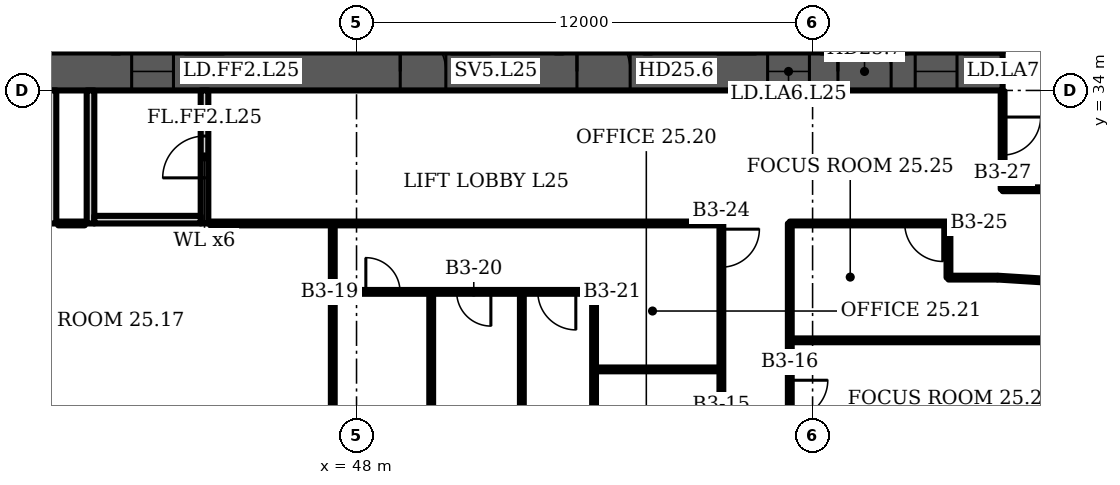
"""IFC4 building model, lengths in metres.
Left out: names, types, materials, properties, quantities, classifications, styles, units other than length and angle.
Written with IfcOpenShell. Run it as: python <this file> out.ifc"""

import sys

from ifc_helpers import new_model, si_unit, direction, frame, frame_2d, origin, place, context, subcontext, project, spatial, rectangle, extrude, element, fill, save


model = new_model("IFC4")
c1 = context("Model", 3, precision=1e-05, world=origin(), true_north=direction((0.0, 1.0)))
c2 = subcontext(c1, "Body", "Model", "MODEL_VIEW")
j1 = project(units=[si_unit("LENGTHUNIT", "METRE"), si_unit("PLANEANGLEUNIT", "RADIAN")], contexts=[c1])
p1 = place(None, origin())
s1 = spatial("IfcSite", under=j1, at=p1, CompositionType="ELEMENT")
p2 = place(p1, origin())
s2 = spatial("IfcBuilding", under=s1, at=p2, CompositionType="ELEMENT")
p3 = place(p2, frame((0.0, 0.0, 111.1)))
s3 = spatial("IfcBuildingStorey", under=s2, at=p3, CompositionType="ELEMENT", Elevation=111.1)
p4 = place(p3, frame((16.0, 34.5, 0.0), z_axis=(0.0, 0.0, 1.0), x_axis=(1.0, 0.0, 0.0)))
e1 = element("IfcWall", 1, at=p4, inside=s3, PredefinedType="SHEAR", context=c2, shape_type="SweptSolid", body=[
    extrude(rectangle(XDim=49.0, YDim=1.0, at=frame_2d((24.5, 0.0))), origin(), (0.0, 0.0, 1.0), 3.6),
])
p5 = place(p4, frame((1.2, 0.0, 0.0)))
e2 = element("IfcOpeningElement", 2, at=p5, cuts=e1, PredefinedType="OPENING", context=c2, shape_type="SweptSolid", body=[
    extrude(rectangle(XDim=1.1, YDim=2.1, at=frame_2d((0.55, 1.05))), frame((0.0, 0.51, 0.0), z_axis=(0.0, -1.0, 0.0), x_axis=(1.0, 0.0, 0.0)), (0.0, 0.0, 1.0), 1.02),
])
p6 = place(p4, frame((5.083, 0.0, 0.0)))
e3 = element("IfcOpeningElement", 3, at=p6, cuts=e1, PredefinedType="OPENING", context=c2, shape_type="SweptSolid", body=[
    extrude(rectangle(XDim=1.1, YDim=2.1, at=frame_2d((0.55, 1.05))), frame((0.0, 0.51, 0.0), z_axis=(0.0, -1.0, 0.0), x_axis=(1.0, 0.0, 0.0)), (0.0, 0.0, 1.0), 1.02),
])
p7 = place(p4, frame((2.933, 0.0, 0.0)))
e4 = element("IfcOpeningElement", 4, at=p7, cuts=e1, PredefinedType="OPENING", context=c2, shape_type="SweptSolid", body=[
    extrude(rectangle(XDim=1.4, YDim=2.1, at=frame_2d((0.7, 1.05))), frame((0.0, 0.51, 0.0), z_axis=(0.0, -1.0, 0.0), x_axis=(1.0, 0.0, 0.0)), (0.0, 0.0, 1.0), 1.02),
])
p8 = place(p4, frame((7.65, 0.0, 0.0)))
e5 = element("IfcOpeningElement", 5, at=p8, cuts=e1, PredefinedType="OPENING", context=c2, shape_type="SweptSolid", body=[
    extrude(rectangle(XDim=1.2, YDim=2.1, at=frame_2d((0.6, 1.05))), frame((0.0, 0.51, 0.0), z_axis=(0.0, -1.0, 0.0), x_axis=(1.0, 0.0, 0.0)), (0.0, 0.0, 1.0), 1.02),
])
p9 = place(p4, frame((14.817, 0.0, 0.0)))
e6 = element("IfcOpeningElement", 6, at=p9, cuts=e1, PredefinedType="OPENING", context=c2, shape_type="SweptSolid", body=[
    extrude(rectangle(XDim=1.1, YDim=2.1, at=frame_2d((0.55, 1.05))), frame((0.0, 0.51, 0.0), z_axis=(0.0, -1.0, 0.0), x_axis=(1.0, 0.0, 0.0)), (0.0, 0.0, 1.0), 1.02),
])
p10 = place(p4, frame((19.083, 0.0, 0.0)))
e7 = element("IfcOpeningElement", 7, at=p10, cuts=e1, PredefinedType="OPENING", context=c2, shape_type="SweptSolid", body=[
    extrude(rectangle(XDim=1.1, YDim=2.1, at=frame_2d((0.55, 1.05))), frame((0.0, 0.51, 0.0), z_axis=(0.0, -1.0, 0.0), x_axis=(1.0, 0.0, 0.0)), (0.0, 0.0, 1.0), 1.02),
])
p11 = place(p4, frame((16.8, 0.0, 0.0)))
e8 = element("IfcOpeningElement", 8, at=p11, cuts=e1, PredefinedType="OPENING", context=c2, shape_type="SweptSolid", body=[
    extrude(rectangle(XDim=1.4, YDim=2.1, at=frame_2d((0.7, 1.05))), frame((0.0, 0.51, 0.0), z_axis=(0.0, -1.0, 0.0), x_axis=(1.0, 0.0, 0.0)), (0.0, 0.0, 1.0), 1.02),
])
p12 = place(p4, frame((21.817, 0.0, 0.0)))
e9 = element("IfcOpeningElement", 9, at=p12, cuts=e1, PredefinedType="OPENING", context=c2, shape_type="SweptSolid", body=[
    extrude(rectangle(XDim=1.1, YDim=2.1, at=frame_2d((0.55, 1.05))), frame((0.0, 0.51, 0.0), z_axis=(0.0, -1.0, 0.0), x_axis=(1.0, 0.0, 0.0)), (0.0, 0.0, 1.0), 1.02),
])
p13 = place(p4, frame((26.083, 0.0, 0.0)))
e10 = element("IfcOpeningElement", 10, at=p13, cuts=e1, PredefinedType="OPENING", context=c2, shape_type="SweptSolid", body=[
    extrude(rectangle(XDim=1.1, YDim=2.1, at=frame_2d((0.55, 1.05))), frame((0.0, 0.51, 0.0), z_axis=(0.0, -1.0, 0.0), x_axis=(1.0, 0.0, 0.0)), (0.0, 0.0, 1.0), 1.02),
])
p14 = place(p4, frame((33.15, 0.0, 0.0)))
e11 = element("IfcOpeningElement", 11, at=p14, cuts=e1, PredefinedType="OPENING", context=c2, shape_type="SweptSolid", body=[
    extrude(rectangle(XDim=1.2, YDim=2.1, at=frame_2d((0.6, 1.05))), frame((0.0, 0.51, 0.0), z_axis=(0.0, -1.0, 0.0), x_axis=(1.0, 0.0, 0.0)), (0.0, 0.0, 1.0), 1.02),
])
p15 = place(p4, frame((37.8, 0.0, 0.0)))
e12 = element("IfcOpeningElement", 12, at=p15, cuts=e1, PredefinedType="OPENING", context=c2, shape_type="SweptSolid", body=[
    extrude(rectangle(XDim=1.4, YDim=2.1, at=frame_2d((0.7, 1.05))), frame((0.0, 0.51, 0.0), z_axis=(0.0, -1.0, 0.0), x_axis=(1.0, 0.0, 0.0)), (0.0, 0.0, 1.0), 1.02),
])
p16 = place(p4, frame((42.817, 0.0, 0.0)))
e13 = element("IfcOpeningElement", 13, at=p16, cuts=e1, PredefinedType="OPENING", context=c2, shape_type="SweptSolid", body=[
    extrude(rectangle(XDim=1.1, YDim=2.1, at=frame_2d((0.55, 1.05))), frame((0.0, 0.51, 0.0), z_axis=(0.0, -1.0, 0.0), x_axis=(1.0, 0.0, 0.0)), (0.0, 0.0, 1.0), 1.02),
])
p17 = place(p4, frame((46.7, 0.0, 0.0)))
e14 = element("IfcOpeningElement", 14, at=p17, cuts=e1, PredefinedType="OPENING", context=c2, shape_type="SweptSolid", body=[
    extrude(rectangle(XDim=1.1, YDim=2.1, at=frame_2d((0.55, 1.05))), frame((0.0, 0.51, 0.0), z_axis=(0.0, -1.0, 0.0), x_axis=(1.0, 0.0, 0.0)), (0.0, 0.0, 1.0), 1.02),
])
p18 = place(p4, frame((44.667, 0.0, 0.0)))
e15 = element("IfcOpeningElement", 15, at=p18, cuts=e1, PredefinedType="OPENING", context=c2, shape_type="SweptSolid", body=[
    extrude(rectangle(XDim=1.4, YDim=2.1, at=frame_2d((0.7, 1.05))), frame((0.0, 0.51, 0.0), z_axis=(0.0, -1.0, 0.0), x_axis=(1.0, 0.0, 0.0)), (0.0, 0.0, 1.0), 1.02),
])
for number, where, z_axis, x_axis in (
    (16, (40.0, 30.5, 0.0), (0.0, 0.0, 1.0), (0.0, 1.0, 0.0)),
    (17, (41.0, 30.5, 0.0), (0.0, 0.0, 1.0), (0.0, 1.0, 0.0)),
):
    element("IfcWall", number, at=place(p3, frame(where, z_axis=z_axis, x_axis=x_axis)), inside=s3, PredefinedType="PARTITIONING", context=c2, shape_type="SweptSolid", body=[
        extrude(rectangle(XDim=3.5, YDim=0.2, at=frame_2d((1.75, 0.0))), origin(), (0.0, 0.0, 1.0), 3.2),
    ])
p19 = place(p3, frame((44.0, 30.5, 0.0), z_axis=(0.0, 0.0, 1.0), x_axis=(0.0, 1.0, 0.0)))
e18 = element("IfcWall", 18, at=p19, inside=s3, PredefinedType="PARTITIONING", context=c2, shape_type="SweptSolid", body=[
    extrude(rectangle(XDim=3.5, YDim=0.2, at=frame_2d((1.75, 0.0))), origin(), (0.0, 0.0, 1.0), 3.2),
])
p20 = place(p19, frame((1.2, 0.0, 0.0)))
e19 = element("IfcOpeningElement", 19, at=p20, cuts=e18, PredefinedType="OPENING", context=c2, shape_type="SweptSolid", body=[
    extrude(rectangle(XDim=1.1, YDim=2.1, at=frame_2d((0.55, 1.05))), frame((0.0, 0.11, 0.0), z_axis=(0.0, -1.0, 0.0), x_axis=(1.0, 0.0, 0.0)), (0.0, 0.0, 1.0), 0.22),
])
p21 = place(p3, frame((41.1, 30.6, 0.0), z_axis=(0.0, 0.0, 1.0), x_axis=(1.0, 0.0, 0.0)))
e20 = element("IfcWall", 20, at=p21, inside=s3, PredefinedType="PARTITIONING", context=c2, shape_type="SweptSolid", body=[
    extrude(rectangle(XDim=2.8, YDim=0.2, at=frame_2d((1.4, 0.0))), origin(), (0.0, 0.0, 1.0), 3.2),
])
p22 = place(p3, frame((47.375, 15.13, 0.0), z_axis=(0.0, 0.0, 1.0), x_axis=(0.0, 1.0, 0.0)))
e21 = element("IfcWall", 21, at=p22, inside=s3, PredefinedType="PARTITIONING", context=c2, shape_type="SweptSolid", body=[
    extrude(rectangle(XDim=15.36, YDim=0.1, at=frame_2d((7.68, 0.0))), origin(), (0.0, 0.0, 1.0), 3.2),
])
p23 = place(p3, frame((47.375, 28.7, 0.0), z_axis=(0.0, 0.0, 1.0), x_axis=(1.0, 0.0, 0.0)))
e22 = element("IfcWall", 22, at=p23, inside=s3, PredefinedType="PARTITIONING", context=c2, shape_type="SweptSolid", body=[
    extrude(rectangle(XDim=6.875, YDim=0.1, at=frame_2d((3.438, 0.0))), origin(), (0.0, 0.0, 1.0), 3.2),
])
p24 = place(p23, frame((0.87, 0.0, 0.0)))
e23 = element("IfcOpeningElement", 23, at=p24, cuts=e22, PredefinedType="OPENING", context=c2, shape_type="SweptSolid", body=[
    extrude(rectangle(XDim=0.9, YDim=2.1, at=frame_2d((0.45, 1.05))), frame((0.0, 0.06, 0.0), z_axis=(0.0, -1.0, 0.0), x_axis=(1.0, 0.0, 0.0)), (0.0, 0.0, 1.0), 0.12),
])
p25 = place(p23, frame((3.26, 0.0, 0.0)))
e24 = element("IfcOpeningElement", 24, at=p25, cuts=e22, PredefinedType="OPENING", context=c2, shape_type="SweptSolid", body=[
    extrude(rectangle(XDim=0.9, YDim=2.1, at=frame_2d((0.45, 1.05))), frame((0.0, 0.06, 0.0), z_axis=(0.0, -1.0, 0.0), x_axis=(1.0, 0.0, 0.0)), (0.0, 0.0, 1.0), 0.12),
])
p26 = place(p23, frame((5.395, 0.0, 0.0)))
e25 = element("IfcOpeningElement", 25, at=p26, cuts=e22, PredefinedType="OPENING", context=c2, shape_type="SweptSolid", body=[
    extrude(rectangle(XDim=1.0, YDim=2.1, at=frame_2d((0.5, 1.05))), frame((0.0, 0.06, 0.0), z_axis=(0.0, -1.0, 0.0), x_axis=(1.0, 0.0, 0.0)), (0.0, 0.0, 1.0), 0.12),
])
for number, where, z_axis, x_axis in (
    (26, (49.965, 15.13, 0.0), (0.0, 0.0, 1.0), (0.0, 1.0, 0.0)),
    (27, (52.35, 15.13, 0.0), (0.0, 0.0, 1.0), (0.0, 1.0, 0.0)),
    (28, (54.25, 15.13, 0.0), (0.0, 0.0, 1.0), (0.0, 1.0, 0.0)),
):
    element("IfcWall", number, at=place(p3, frame(where, z_axis=z_axis, x_axis=x_axis)), inside=s3, PredefinedType="PARTITIONING", context=c2, shape_type="SweptSolid", body=[
        extrude(rectangle(XDim=13.57, YDim=0.1, at=frame_2d((6.785, 0.0))), origin(), (0.0, 0.0, 1.0), 3.2),
    ])
p27 = place(p3, frame((54.25, 26.66, 0.0), z_axis=(0.0, 0.0, 1.0), x_axis=(1.0, 0.0, 0.0)))
e29 = element("IfcWall", 29, at=p27, inside=s3, PredefinedType="PARTITIONING", context=c2, shape_type="SweptSolid", body=[
    extrude(rectangle(XDim=3.35, YDim=0.1, at=frame_2d((1.675, 0.0))), origin(), (0.0, 0.0, 1.0), 3.2),
])
p28 = place(p3, frame((57.6, -0.79, 0.0), z_axis=(0.0, 0.0, 1.0), x_axis=(0.0, 1.0, 0.0)))
e30 = element("IfcWall", 30, at=p28, inside=s3, PredefinedType="PARTITIONING", context=c2, shape_type="SweptSolid", body=[
    extrude(rectangle(XDim=31.29, YDim=0.1, at=frame_2d((15.645, 0.0))), origin(), (0.0, 0.0, 1.0), 2.58),
])
p29 = place(p28, frame((7.5, 0.0, 0.0)))
e31 = element("IfcOpeningElement", 31, at=p29, cuts=e30, PredefinedType="OPENING", context=c2, shape_type="SweptSolid", body=[
    extrude(rectangle(XDim=1.0, YDim=2.1, at=frame_2d((0.5, 1.05))), frame((0.0, 0.06, 0.0), z_axis=(0.0, -1.0, 0.0), x_axis=(1.0, 0.0, 0.0)), (0.0, 0.0, 1.0), 0.12),
])
p30 = place(p28, frame((17.344, 0.0, 0.0)))
e32 = element("IfcOpeningElement", 32, at=p30, cuts=e30, PredefinedType="OPENING", context=c2, shape_type="SweptSolid", body=[
    extrude(rectangle(XDim=1.0, YDim=2.1, at=frame_2d((0.5, 1.05))), frame((0.0, 0.06, 0.0), z_axis=(0.0, -1.0, 0.0), x_axis=(1.0, 0.0, 0.0)), (0.0, 0.0, 1.0), 0.12),
])
p31 = place(p28, frame((21.185, 0.0, 0.0)))
e33 = element("IfcOpeningElement", 33, at=p31, cuts=e30, PredefinedType="OPENING", context=c2, shape_type="SweptSolid", body=[
    extrude(rectangle(XDim=1.0, YDim=2.1, at=frame_2d((0.5, 1.05))), frame((0.0, 0.06, 0.0), z_axis=(0.0, -1.0, 0.0), x_axis=(1.0, 0.0, 0.0)), (0.0, 0.0, 1.0), 0.12),
])
p32 = place(p28, frame((25.03, 0.0, 0.0)))
e34 = element("IfcOpeningElement", 34, at=p32, cuts=e30, PredefinedType="OPENING", context=c2, shape_type="SweptSolid", body=[
    extrude(rectangle(XDim=1.0, YDim=2.1, at=frame_2d((0.5, 1.05))), frame((0.0, 0.06, 0.0), z_axis=(0.0, -1.0, 0.0), x_axis=(1.0, 0.0, 0.0)), (0.0, 0.0, 1.0), 0.12),
])
p33 = place(p28, frame((30.139, 0.0, 0.0)))
e35 = element("IfcOpeningElement", 35, at=p33, cuts=e30, PredefinedType="OPENING", context=c2, shape_type="SweptSolid", body=[
    extrude(rectangle(XDim=1.0, YDim=2.1, at=frame_2d((0.5, 1.05))), frame((0.0, 0.06, 0.0), z_axis=(0.0, -1.0, 0.0), x_axis=(1.0, 0.0, 0.0)), (0.0, 0.0, 1.0), 0.12),
])
p34 = place(p3, frame((59.4, 13.7, 0.0), z_axis=(0.0, 0.0, 1.0), x_axis=(0.0, 1.0, 0.0)))
e36 = element("IfcWall", 36, at=p34, inside=s3, PredefinedType="PARTITIONING", context=c2, shape_type="SweptSolid", body=[
    extrude(rectangle(XDim=16.8, YDim=0.1, at=frame_2d((8.4, 0.0))), origin(), (0.0, 0.0, 1.0), 3.2),
])
p35 = place(p34, frame((2.45, 0.0, 0.0)))
e37 = element("IfcOpeningElement", 37, at=p35, cuts=e36, PredefinedType="OPENING", context=c2, shape_type="SweptSolid", body=[
    extrude(rectangle(XDim=1.0, YDim=2.1, at=frame_2d((0.5, 1.05))), frame((0.0, 0.06, 0.0), z_axis=(0.0, -1.0, 0.0), x_axis=(1.0, 0.0, 0.0)), (0.0, 0.0, 1.0), 0.12),
])
p36 = place(p34, frame((7.125, 0.0, 0.0)))
e38 = element("IfcOpeningElement", 38, at=p36, cuts=e36, PredefinedType="OPENING", context=c2, shape_type="SweptSolid", body=[
    extrude(rectangle(XDim=1.0, YDim=2.1, at=frame_2d((0.5, 1.05))), frame((0.0, 0.06, 0.0), z_axis=(0.0, -1.0, 0.0), x_axis=(1.0, 0.0, 0.0)), (0.0, 0.0, 1.0), 0.12),
])
p37 = place(p34, frame((11.675, 0.0, 0.0)))
e39 = element("IfcOpeningElement", 39, at=p37, cuts=e36, PredefinedType="OPENING", context=c2, shape_type="SweptSolid", body=[
    extrude(rectangle(XDim=1.0, YDim=2.1, at=frame_2d((0.5, 1.05))), frame((0.0, 0.06, 0.0), z_axis=(0.0, -1.0, 0.0), x_axis=(1.0, 0.0, 0.0)), (0.0, 0.0, 1.0), 0.12),
])
p38 = place(p3, frame((59.4, 27.425, 0.0), z_axis=(0.0, 0.0, 1.0), x_axis=(1.0, 0.0, 0.0)))
e40 = element("IfcWall", 40, at=p38, inside=s3, PredefinedType="PARTITIONING", context=c2, shape_type="SweptSolid", body=[
    extrude(rectangle(XDim=8.49, YDim=0.1, at=frame_2d((4.245, 0.0))), origin(), (0.0, 0.0, 1.0), 3.2),
])
p39 = place(p3, frame((59.4, 30.5, 0.0), z_axis=(0.0, 0.0, 1.0), x_axis=(1.0, 0.0, 0.0)))
e41 = element("IfcWall", 41, at=p39, inside=s3, PredefinedType="PARTITIONING", context=c2, shape_type="SweptSolid", body=[
    extrude(rectangle(XDim=4.175, YDim=0.1, at=frame_2d((2.087, 0.0))), origin(), (0.0, 0.0, 1.0), 3.2),
])
p40 = place(p39, frame((3.025, 0.0, 0.0)))
e42 = element("IfcOpeningElement", 42, at=p40, cuts=e41, PredefinedType="OPENING", context=c2, shape_type="SweptSolid", body=[
    extrude(rectangle(XDim=1.0, YDim=2.1, at=frame_2d((0.5, 1.05))), frame((0.0, 0.06, 0.0), z_axis=(0.0, -1.0, 0.0), x_axis=(1.0, 0.0, 0.0)), (0.0, 0.0, 1.0), 0.12),
])
p41 = place(p3, frame((63.575, 29.075, 0.0), z_axis=(0.0, 0.0, 1.0), x_axis=(0.0, 1.0, 0.0)))
e43 = element("IfcWall", 43, at=p41, inside=s3, PredefinedType="PARTITIONING", context=c2, shape_type="SweptSolid", body=[
    extrude(rectangle(XDim=1.425, YDim=0.1, at=frame_2d((0.712, 0.0))), origin(), (0.0, 0.0, 1.0), 3.2),
])
p42 = place(p3, frame((63.575, 29.075, 0.0), z_axis=(0.0, 0.0, 1.0), x_axis=(1.0, 0.0, 0.0)))
e44 = element("IfcWall", 44, at=p42, inside=s3, PredefinedType="PARTITIONING", context=c2, shape_type="SweptSolid", body=[
    extrude(rectangle(XDim=1.285, YDim=0.1, at=frame_2d((0.643, 0.0))), origin(), (0.0, 0.0, 1.0), 3.2),
])
p43 = place(p3, frame((65.0, 31.4, 0.0), z_axis=(0.0, 0.0, 1.0), x_axis=(0.0, 1.0, 0.0)))
e45 = element("IfcWall", 45, at=p43, inside=s3, PredefinedType="PARTITIONING", context=c2, shape_type="SweptSolid", body=[
    extrude(rectangle(XDim=2.58, YDim=0.1, at=frame_2d((1.29, 0.0))), origin(), (0.0, 0.0, 1.0), 3.2),
])
p44 = place(p43, frame((0.9, 0.0, 0.0)))
e46 = element("IfcOpeningElement", 46, at=p44, cuts=e45, PredefinedType="OPENING", context=c2, shape_type="SweptSolid", body=[
    extrude(rectangle(XDim=1.0, YDim=2.1, at=frame_2d((0.5, 1.05))), frame((0.0, 0.06, 0.0), z_axis=(0.0, -1.0, 0.0), x_axis=(1.0, 0.0, 0.0)), (0.0, 0.0, 1.0), 0.12),
])
p45 = place(p3, frame((65.0, 31.4, 0.0), z_axis=(0.0, 0.0, 1.0), x_axis=(1.0, 0.0, 0.0)))
e47 = element("IfcWall", 47, at=p45, inside=s3, PredefinedType="PARTITIONING", context=c2, shape_type="SweptSolid", body=[
    extrude(rectangle(XDim=4.69, YDim=0.1, at=frame_2d((2.345, 0.0))), origin(), (0.0, 0.0, 1.0), 3.2),
])
p46 = place(p3, frame((67.89, 28.885, 0.0), z_axis=(0.0, 0.0, 1.0), x_axis=(-0.998031, 0.062786, 0.0)))
e48 = element("IfcWall", 48, at=p46, inside=s3, PredefinedType="PARTITIONING", context=c2, shape_type="SweptSolid", body=[
    extrude(rectangle(XDim=3.021, YDim=0.1, at=frame_2d((1.511, 0.0))), origin(), (0.0, 0.0, 1.0), 3.2),
])
p47 = place(p3, frame((40.15, 30.5, 0.0), z_axis=(0.0, 0.0, 1.0), x_axis=(1.0, 0.0, 0.0)))
e49 = element("IfcWall", 49, at=p47, inside=s3, PredefinedType="PARTITIONING", context=c2, shape_type="SweptSolid", body=[
    extrude(rectangle(XDim=0.7, YDim=0.1, at=frame_2d((0.35, 0.0))), origin(), (0.0, 0.0, 1.0), 3.2),
])
p48 = place(p3, frame((44.15, 30.5, 0.0), z_axis=(0.0, 0.0, 1.0), x_axis=(1.0, 0.0, 0.0)))
e50 = element("IfcWall", 50, at=p48, inside=s3, PredefinedType="PARTITIONING", context=c2, shape_type="SweptSolid", body=[
    extrude(rectangle(XDim=13.45, YDim=0.1, at=frame_2d((6.725, 0.0))), origin(), (0.0, 0.0, 1.0), 3.2),
])
p49 = place(p13, origin())
e51 = element("IfcDoor", 51, at=p49, inside=s3, OperationType="DOUBLE_DOOR_SLIDING", PredefinedType="DOOR", context=c2, shape_type="SweptSolid", body=[
    extrude(rectangle(XDim=1.1, YDim=2.1, at=frame_2d((0.55, 1.05))), frame((0.0, 0.025, 0.0), z_axis=(0.0, -1.0, 0.0), x_axis=(1.0, 0.0, 0.0)), (0.0, 0.0, 1.0), 0.05),
])
fill(e10, e51)
p50 = place(p14, origin())
e52 = element("IfcDoor", 52, at=p50, inside=s3, OperationType="SINGLE_SWING_LEFT", PredefinedType="DOOR", context=c2, shape_type="SweptSolid", body=[
    extrude(rectangle(XDim=1.2, YDim=2.1, at=frame_2d((0.6, 1.05))), frame((0.0, 0.025, 0.0), z_axis=(0.0, -1.0, 0.0), x_axis=(1.0, 0.0, 0.0)), (0.0, 0.0, 1.0), 0.05),
])
fill(e11, e52)
p51 = place(p15, origin())
e53 = element("IfcDoor", 53, at=p51, inside=s3, OperationType="DOUBLE_DOOR_SINGLE_SWING", PredefinedType="DOOR", context=c2, shape_type="SweptSolid", body=[
    extrude(rectangle(XDim=1.4, YDim=2.1, at=frame_2d((0.7, 1.05))), frame((0.0, 0.025, 0.0), z_axis=(0.0, -1.0, 0.0), x_axis=(1.0, 0.0, 0.0)), (0.0, 0.0, 1.0), 0.05),
])
fill(e12, e53)
p52 = place(p16, origin())
e54 = element("IfcDoor", 54, at=p52, inside=s3, OperationType="DOUBLE_DOOR_SLIDING", PredefinedType="DOOR", context=c2, shape_type="SweptSolid", body=[
    extrude(rectangle(XDim=1.1, YDim=2.1, at=frame_2d((0.55, 1.05))), frame((0.0, 0.025, 0.0), z_axis=(0.0, -1.0, 0.0), x_axis=(1.0, 0.0, 0.0)), (0.0, 0.0, 1.0), 0.05),
])
fill(e13, e54)
p53 = place(p17, origin())
e55 = element("IfcDoor", 55, at=p53, inside=s3, OperationType="DOUBLE_DOOR_SLIDING", PredefinedType="DOOR", context=c2, shape_type="SweptSolid", body=[
    extrude(rectangle(XDim=1.1, YDim=2.1, at=frame_2d((0.55, 1.05))), frame((0.0, 0.025, 0.0), z_axis=(0.0, -1.0, 0.0), x_axis=(1.0, 0.0, 0.0)), (0.0, 0.0, 1.0), 0.05),
])
fill(e14, e55)
p54 = place(p18, origin())
e56 = element("IfcDoor", 56, at=p54, inside=s3, OperationType="DOUBLE_DOOR_SINGLE_SWING", PredefinedType="DOOR", context=c2, shape_type="SweptSolid", body=[
    extrude(rectangle(XDim=1.4, YDim=2.1, at=frame_2d((0.7, 1.05))), frame((0.0, 0.025, 0.0), z_axis=(0.0, -1.0, 0.0), x_axis=(1.0, 0.0, 0.0)), (0.0, 0.0, 1.0), 0.05),
])
fill(e15, e56)
p55 = place(p20, origin())
e57 = element("IfcDoor", 57, at=p55, inside=s3, OperationType="SINGLE_SWING_LEFT", PredefinedType="DOOR", context=c2, shape_type="SweptSolid", body=[
    extrude(rectangle(XDim=1.1, YDim=2.1, at=frame_2d((0.55, 1.05))), frame((0.0, 0.025, 0.0), z_axis=(0.0, -1.0, 0.0), x_axis=(1.0, 0.0, 0.0)), (0.0, 0.0, 1.0), 0.05),
])
fill(e19, e57)
p56 = place(p37, origin())
e58 = element("IfcDoor", 58, at=p56, inside=s3, OperationType="SINGLE_SWING_RIGHT", PredefinedType="DOOR", context=c2, shape_type="SweptSolid", body=[
    extrude(rectangle(XDim=1.0, YDim=2.1, at=frame_2d((0.5, 1.05))), frame((0.0, 0.025, 0.0), z_axis=(0.0, -1.0, 0.0), x_axis=(1.0, 0.0, 0.0)), (0.0, 0.0, 1.0), 0.05),
])
fill(e39, e58)
p57 = place(p24, origin())
e59 = element("IfcDoor", 59, at=p57, inside=s3, OperationType="SINGLE_SWING_LEFT", PredefinedType="DOOR", context=c2, shape_type="SweptSolid", body=[
    extrude(rectangle(XDim=0.9, YDim=2.1, at=frame_2d((0.45, 1.05))), frame((0.0, 0.025, 0.0), z_axis=(0.0, -1.0, 0.0), x_axis=(1.0, 0.0, 0.0)), (0.0, 0.0, 1.0), 0.05),
])
fill(e23, e59)
p58 = place(p25, origin())
e60 = element("IfcDoor", 60, at=p58, inside=s3, OperationType="SINGLE_SWING_RIGHT", PredefinedType="DOOR", context=c2, shape_type="SweptSolid", body=[
    extrude(rectangle(XDim=0.9, YDim=2.1, at=frame_2d((0.45, 1.05))), frame((0.0, 0.025, 0.0), z_axis=(0.0, -1.0, 0.0), x_axis=(1.0, 0.0, 0.0)), (0.0, 0.0, 1.0), 0.05),
])
fill(e24, e60)
p59 = place(p26, origin())
e61 = element("IfcDoor", 61, at=p59, inside=s3, OperationType="SINGLE_SWING_RIGHT", PredefinedType="DOOR", context=c2, shape_type="SweptSolid", body=[
    extrude(rectangle(XDim=1.0, YDim=2.1, at=frame_2d((0.5, 1.05))), frame((0.0, 0.025, 0.0), z_axis=(0.0, -1.0, 0.0), x_axis=(1.0, 0.0, 0.0)), (0.0, 0.0, 1.0), 0.05),
])
fill(e25, e61)
p60 = place(p33, origin())
e62 = element("IfcDoor", 62, at=p60, inside=s3, OperationType="SINGLE_SWING_RIGHT", PredefinedType="DOOR", context=c2, shape_type="SweptSolid", body=[
    extrude(rectangle(XDim=1.0, YDim=2.1, at=frame_2d((0.5, 1.05))), frame((0.0, 0.025, 0.0), z_axis=(0.0, -1.0, 0.0), x_axis=(1.0, 0.0, 0.0)), (0.0, 0.0, 1.0), 0.05),
])
fill(e35, e62)
p61 = place(p40, origin())
e63 = element("IfcDoor", 63, at=p61, inside=s3, OperationType="SINGLE_SWING_RIGHT", PredefinedType="DOOR", context=c2, shape_type="SweptSolid", body=[
    extrude(rectangle(XDim=1.0, YDim=2.1, at=frame_2d((0.5, 1.05))), frame((0.0, 0.025, 0.0), z_axis=(0.0, -1.0, 0.0), x_axis=(1.0, 0.0, 0.0)), (0.0, 0.0, 1.0), 0.05),
])
fill(e42, e63)
p62 = place(p44, origin())
e64 = element("IfcDoor", 64, at=p62, inside=s3, OperationType="SINGLE_SWING_RIGHT", PredefinedType="DOOR", context=c2, shape_type="SweptSolid", body=[
    extrude(rectangle(XDim=1.0, YDim=2.1, at=frame_2d((0.5, 1.05))), frame((0.0, 0.025, 0.0), z_axis=(0.0, -1.0, 0.0), x_axis=(1.0, 0.0, 0.0)), (0.0, 0.0, 1.0), 0.05),
])
fill(e46, e64)
save(model, sys.argv[1])
